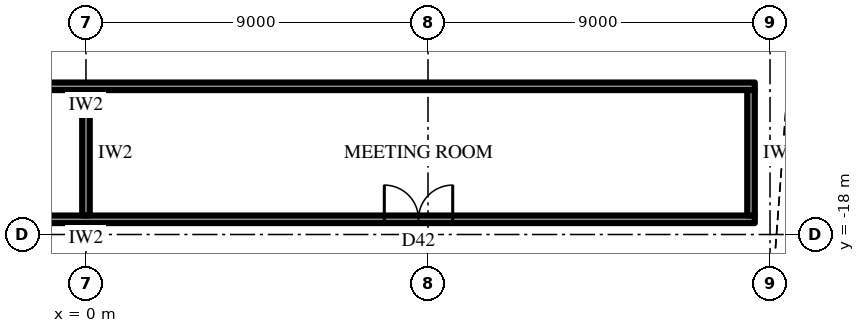
"""IFC4 building model, lengths in metres.
Left out: names, types, materials, properties, quantities, classifications, styles, units other than length and angle.
Written with IfcOpenShell. Run it as: python <this file> out.ifc"""

import sys

from ifc_helpers import new_model, si_unit, direction, frame, frame_2d, origin, place, context, subcontext, project, spatial, rectangle, extrude, element, fill, save


model = new_model("IFC4")
c1 = context("Model", 3, precision=1e-05, world=origin(), true_north=direction((0.0, 1.0)))
c2 = subcontext(c1, "Body", "Model", "MODEL_VIEW")
j1 = project(units=[si_unit("LENGTHUNIT", "METRE"), si_unit("PLANEANGLEUNIT", "RADIAN")], contexts=[c1])
p1 = place(None, origin())
s1 = spatial("IfcSite", under=j1, at=p1, CompositionType="ELEMENT")
p2 = place(p1, origin())
s2 = spatial("IfcBuilding", under=s1, at=p2, CompositionType="ELEMENT")
p3 = place(p2, frame((0.0, 0.0, 127.9)))
s3 = spatial("IfcBuildingStorey", under=s2, at=p3, CompositionType="ELEMENT", Elevation=127.9)
p4 = place(p3, frame((17.6, -14.1, 0.0), z_axis=(0.0, 0.0, 1.0), x_axis=(-1.0, 0.0, 0.0)))
e1 = element("IfcWall", 1, at=p4, inside=s3, PredefinedType="PARTITIONING", context=c2, shape_type="SweptSolid", body=[
    extrude(rectangle(XDim=35.2, YDim=0.2, at=frame_2d((17.6, 0.0))), origin(), (0.0, 0.0, 1.0), 4.0),
])
p5 = place(p3, frame((17.6, -17.6, 0.0), z_axis=(0.0, 0.0, 1.0), x_axis=(-1.0, 0.0, 0.0)))
e2 = element("IfcWall", 2, at=p5, inside=s3, PredefinedType="PARTITIONING", context=c2, shape_type="SweptSolid", body=[
    extrude(rectangle(XDim=35.2, YDim=0.2, at=frame_2d((17.6, 0.0))), origin(), (0.0, 0.0, 1.0), 4.0),
])
p6 = place(p5, frame((7.95, 0.0, 0.0)))
e3 = element("IfcOpeningElement", 3, at=p6, cuts=e2, PredefinedType="OPENING", context=c2, shape_type="SweptSolid", body=[
    extrude(rectangle(XDim=1.8, YDim=2.4, at=frame_2d((0.9, 1.2))), frame((0.0, 0.11, 0.0), z_axis=(0.0, -1.0, 0.0), x_axis=(1.0, 0.0, 0.0)), (0.0, 0.0, 1.0), 0.22),
])
p7 = place(p5, frame((25.45, 0.0, 0.0)))
e4 = element("IfcOpeningElement", 4, at=p7, cuts=e2, PredefinedType="OPENING", context=c2, shape_type="SweptSolid", body=[
    extrude(rectangle(XDim=1.8, YDim=2.4, at=frame_2d((0.9, 1.2))), frame((0.0, 0.11, 0.0), z_axis=(0.0, -1.0, 0.0), x_axis=(1.0, 0.0, 0.0)), (0.0, 0.0, 1.0), 0.22),
])
p8 = place(p3, frame((17.5, -14.2, 0.0), z_axis=(0.0, 0.0, 1.0), x_axis=(0.0, -1.0, 0.0)))
e5 = element("IfcWall", 5, at=p8, inside=s3, PredefinedType="PARTITIONING", context=c2, shape_type="SweptSolid", body=[
    extrude(rectangle(XDim=3.3, YDim=0.2, at=frame_2d((1.65, 0.0))), origin(), (0.0, 0.0, 1.0), 4.0),
])
p9 = place(p3, frame((0.0, -14.2, 0.0), z_axis=(0.0, 0.0, 1.0), x_axis=(0.0, -1.0, 0.0)))
e6 = element("IfcWall", 6, at=p9, inside=s3, PredefinedType="PARTITIONING", context=c2, shape_type="SweptSolid", body=[
    extrude(rectangle(XDim=3.3, YDim=0.2, at=frame_2d((1.65, 0.0))), origin(), (0.0, 0.0, 1.0), 2.992),
])
p10 = place(p3, frame((17.463, -21.753, 0.0), z_axis=(0.0, 0.0, 1.0), x_axis=(0.500010972563, 0.86601906868, 0.0)))
e7 = element("IfcWall", 7, at=p10, inside=s3, PredefinedType="PARTITIONING", context=c2, shape_type="SweptSolid", body=[
    extrude(rectangle(XDim=15.211, YDim=0.2, at=frame_2d((7.605, 0.0))), origin(), (0.0, 0.0, 1.0), 4.0),
])
p11 = place(p10, frame((7.105, 0.0, 0.0)))
e8 = element("IfcOpeningElement", 8, at=p11, cuts=e7, PredefinedType="OPENING", context=c2, shape_type="SweptSolid", body=[
    extrude(rectangle(XDim=1.0, YDim=2.2, at=frame_2d((0.5, 1.1))), frame((0.0, 0.11, 0.0), z_axis=(0.0, -1.0, 0.0), x_axis=(1.0, 0.0, 0.0)), (0.0, 0.0, 1.0), 0.22),
])
p12 = place(p6, frame((1.8, 0.0, 0.0), z_axis=(0.0, 0.0, 1.0), x_axis=(-1.0, 0.0, 0.0)))
e9 = element("IfcDoor", 9, at=p12, inside=s3, OperationType="DOUBLE_DOOR_SINGLE_SWING", PredefinedType="DOOR", context=c2, shape_type="SweptSolid", body=[
    extrude(rectangle(XDim=1.8, YDim=2.4, at=frame_2d((0.9, 1.2))), frame((0.0, 0.025, 0.0), z_axis=(0.0, -1.0, 0.0), x_axis=(1.0, 0.0, 0.0)), (0.0, 0.0, 1.0), 0.05),
])
fill(e3, e9)
save(model, sys.argv[1])
